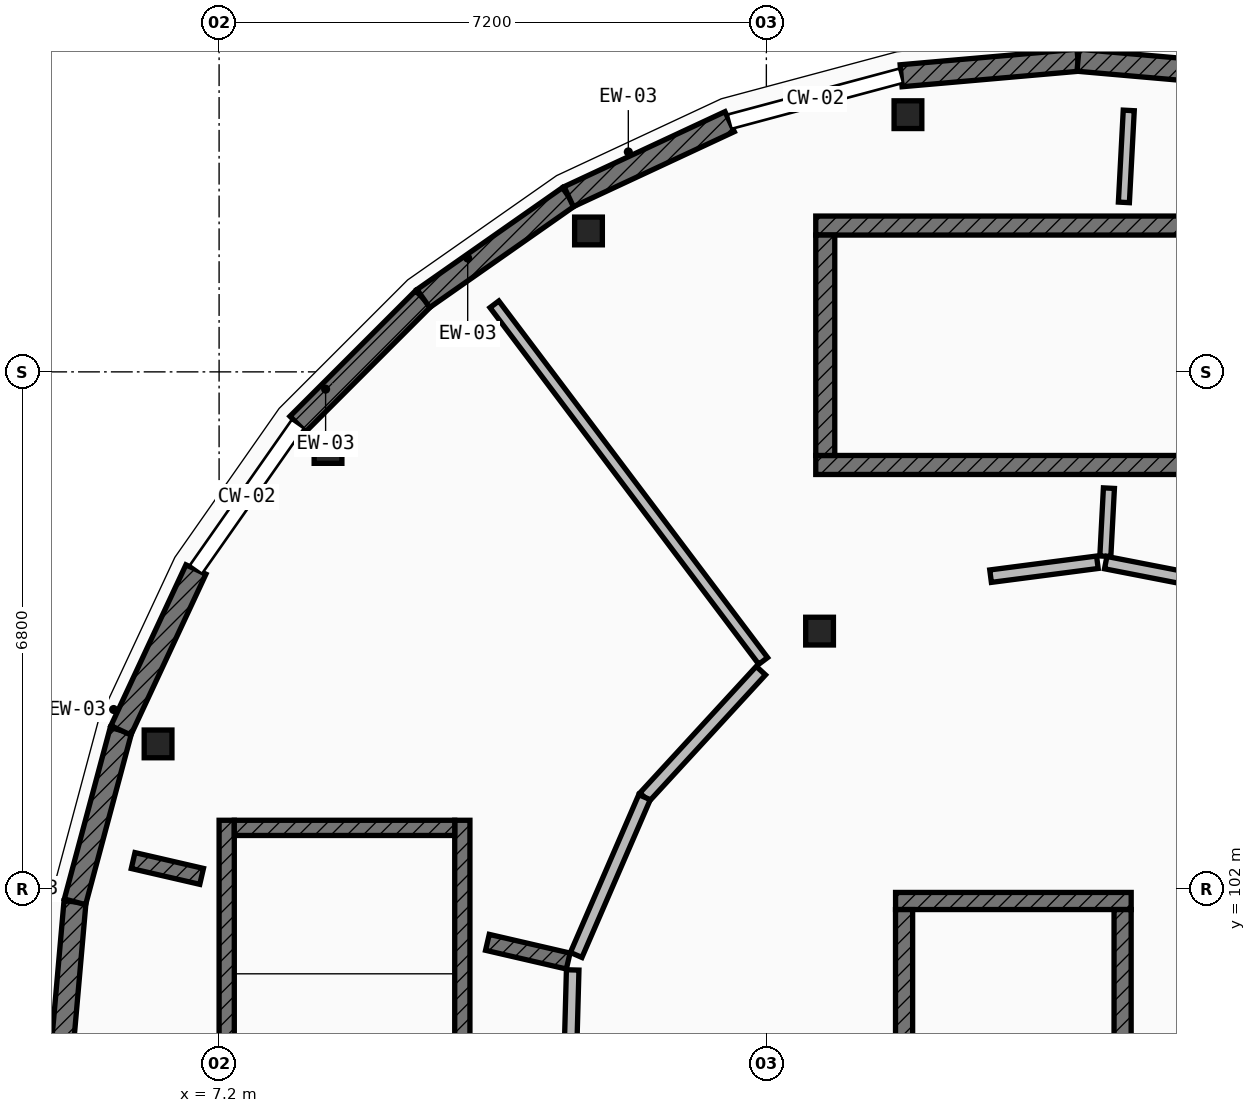
"""IFC4 building model, lengths in metres.
Left out: names, types, materials, properties, quantities, classifications, styles, units other than length and angle.
Written with IfcOpenShell. Run it as: python <this file> out.ifc"""

import sys

from ifc_helpers import new_model, si_unit, direction, frame, frame_2d, origin, origin_2d, place, context, subcontext, project, spatial, rectangle, extrude, element, fill, save


model = new_model("IFC4")
c1 = context("Model", 3, precision=1e-05, world=origin(), true_north=direction((0.0, 1.0)))
c2 = subcontext(c1, "Body", "Model", "MODEL_VIEW")
j1 = project(units=[si_unit("LENGTHUNIT", "METRE"), si_unit("PLANEANGLEUNIT", "RADIAN")], contexts=[c1])
p1 = place(None, origin())
s1 = spatial("IfcSite", under=j1, at=p1, CompositionType="ELEMENT")
p2 = place(p1, origin())
s2 = spatial("IfcBuilding", under=s1, at=p2, CompositionType="ELEMENT")
p3 = place(p2, frame((0.0, 0.0, 8.75)))
s3 = spatial("IfcBuildingStorey", under=s2, at=p3, CompositionType="ELEMENT", Elevation=8.75)
for number, where, z_axis, x_axis in (
    (1, (16.263, 112.184, 0.0), (0.0, 0.0, 1.0), (1.0, 0.0, 0.0)),
    (2, (12.06, 110.654, 0.0), (0.0, 0.0, 1.0), (1.0, 0.0, 0.0)),
    (3, (8.633, 107.779, 0.0), (0.0, 0.0, 1.0), (1.0, 0.0, 0.0)),
    (4, (6.397, 103.905, 0.0), (0.0, 0.0, 1.0), (1.0, 0.0, 0.0)),
    (5, (15.1, 105.389, 0.0), (0.0, 0.0, 1.0), (1.0, 0.0, 0.0)),
):
    element("IfcColumn", number, at=place(p3, frame(where, z_axis=z_axis, x_axis=x_axis)), inside=s3, PredefinedType="COLUMN", context=c2, shape_type="SweptSolid", body=[
        extrude(rectangle(XDim=0.365, YDim=0.365, at=origin_2d()), origin(), (0.0, 0.0, 1.0), 4.2),
    ])
p4 = place(p3, frame((5.1, 99.5, 0.0), z_axis=(0.0, 0.0, 1.0), x_axis=(0.087274565792, 0.996184295282, 0.0)))
e6 = element("IfcWall", 6, at=p4, inside=s3, PredefinedType="ELEMENTEDWALL", context=c2, shape_type="SweptSolid", body=[
    extrude(rectangle(XDim=2.336, YDim=0.29, at=frame_2d((1.168, 0.0))), origin(), (0.0, 0.0, 1.0), 3.329),
])
p5 = place(p3, frame((5.304, 101.827, 0.0), z_axis=(0.0, 0.0, 1.0), x_axis=(0.258612423585, 0.965981166673, 0.0)))
e7 = element("IfcWall", 7, at=p5, inside=s3, PredefinedType="ELEMENTEDWALL", context=c2, shape_type="SweptSolid", body=[
    extrude(rectangle(XDim=2.335, YDim=0.29, at=frame_2d((1.168, 0.0))), origin(), (0.0, 0.0, 1.0), 3.329),
])
p6 = place(p5, frame((0.718, 0.0, 0.85)))
e8 = element("IfcOpeningElement", 8, at=p6, cuts=e7, PredefinedType="OPENING", context=c2, shape_type="SweptSolid", body=[
    extrude(rectangle(XDim=0.9, YDim=1.4, at=frame_2d((0.45, 0.7))), frame((0.0, 0.155, 0.0), z_axis=(0.0, -1.0, 0.0), x_axis=(1.0, 0.0, 0.0)), (0.0, 0.0, 1.0), 0.31),
])
p7 = place(p3, frame((5.908, 104.083, 0.0), z_axis=(0.0, 0.0, 1.0), x_axis=(0.422587894318, 0.906321946979, 0.0)))
e9 = element("IfcWall", 9, at=p7, inside=s3, PredefinedType="ELEMENTEDWALL", context=c2, shape_type="SweptSolid", body=[
    extrude(rectangle(XDim=2.336, YDim=0.29, at=frame_2d((1.168, 0.0))), origin(), (0.0, 0.0, 1.0), 3.329),
])
p8 = place(p7, frame((0.718, 0.0, 0.85)))
e10 = element("IfcOpeningElement", 10, at=p8, cuts=e9, PredefinedType="OPENING", context=c2, shape_type="SweptSolid", body=[
    extrude(rectangle(XDim=0.9, YDim=1.65, at=frame_2d((0.45, 0.825))), frame((0.0, 0.155, 0.0), z_axis=(0.0, -1.0, 0.0), x_axis=(1.0, 0.0, 0.0)), (0.0, 0.0, 1.0), 0.31),
])
p9 = place(p3, frame((8.235, 108.113, 0.0), z_axis=(0.0, 0.0, 1.0), x_axis=(0.707106781187, 0.707106781187, 0.0)))
e11 = element("IfcWall", 11, at=p9, inside=s3, PredefinedType="ELEMENTEDWALL", context=c2, shape_type="SweptSolid", body=[
    extrude(rectangle(XDim=2.336, YDim=0.29, at=frame_2d((1.168, 0.0))), origin(), (0.0, 0.0, 1.0), 3.329),
])
p10 = place(p9, frame((0.718, 0.0, 0.85)))
e12 = element("IfcOpeningElement", 12, at=p10, cuts=e11, PredefinedType="OPENING", context=c2, shape_type="SweptSolid", body=[
    extrude(rectangle(XDim=0.9, YDim=1.9, at=frame_2d((0.45, 0.95))), frame((0.0, 0.155, 0.0), z_axis=(0.0, -1.0, 0.0), x_axis=(1.0, 0.0, 0.0)), (0.0, 0.0, 1.0), 0.31),
])
p11 = place(p3, frame((9.887, 109.765, 0.0), z_axis=(0.0, 0.0, 1.0), x_axis=(0.819045278347, 0.573728883722, 0.0)))
e13 = element("IfcWall", 13, at=p11, inside=s3, PredefinedType="ELEMENTEDWALL", context=c2, shape_type="SweptSolid", body=[
    extrude(rectangle(XDim=2.336, YDim=0.29, at=frame_2d((1.168, 0.0))), origin(), (0.0, 0.0, 1.0), 3.329),
])
p12 = place(p11, frame((0.708, 0.0, 0.85)))
e14 = element("IfcOpeningElement", 14, at=p12, cuts=e13, PredefinedType="OPENING", context=c2, shape_type="SweptSolid", body=[
    extrude(rectangle(XDim=0.92, YDim=1.55, at=frame_2d((0.46, 0.775))), frame((0.0, 0.155, 0.0), z_axis=(0.0, -1.0, 0.0), x_axis=(1.0, 0.0, 0.0)), (0.0, 0.0, 1.0), 0.31),
])
p13 = place(p3, frame((11.8, 111.105, 0.0), z_axis=(0.0, 0.0, 1.0), x_axis=(0.906321946979, 0.422587894318, 0.0)))
e15 = element("IfcWall", 15, at=p13, inside=s3, PredefinedType="ELEMENTEDWALL", context=c2, shape_type="SweptSolid", body=[
    extrude(rectangle(XDim=2.336, YDim=0.29, at=frame_2d((1.168, 0.0))), origin(), (0.0, 0.0, 1.0), 3.329),
])
p14 = place(p13, frame((0.693, 0.0, 0.85)))
e16 = element("IfcOpeningElement", 16, at=p14, cuts=e15, PredefinedType="OPENING", context=c2, shape_type="SweptSolid", body=[
    extrude(rectangle(XDim=0.95, YDim=1.35, at=frame_2d((0.475, 0.675))), frame((0.0, 0.155, 0.0), z_axis=(0.0, -1.0, 0.0), x_axis=(1.0, 0.0, 0.0)), (0.0, 0.0, 1.0), 0.31),
])
for number, where, z_axis, x_axis in (
    (17, (16.173, 112.696, 0.0), (0.0, 0.0, 1.0), (0.996, 0.087, 0.0)),
    (18, (18.5, 112.9, 0.0), (0.0, 0.0, 1.0), (0.996, -0.087, 0.0)),
):
    element("IfcWall", number, at=place(p3, frame(where, z_axis=z_axis, x_axis=x_axis)), inside=s3, PredefinedType="ELEMENTEDWALL", context=c2, shape_type="SweptSolid", body=[
        extrude(rectangle(XDim=2.336, YDim=0.29, at=frame_2d((1.168, 0.0))), origin(), (0.0, 0.0, 1.0), 3.329),
    ])
p15 = place(p3, frame((15.05, 107.575, 0.0), z_axis=(0.0, 0.0, 1.0), x_axis=(1.0, 0.0, 0.0)))
e19 = element("IfcWall", 19, at=p15, inside=s3, PredefinedType="SHEAR", context=c2, shape_type="SweptSolid", body=[
    extrude(rectangle(XDim=6.9, YDim=0.25, at=frame_2d((3.45, 0.0))), origin(), (0.0, 0.0, 1.0), 3.975),
])
p16 = place(p15, frame((0.43, 0.0, 0.0)))
e20 = element("IfcOpeningElement", 20, at=p16, cuts=e19, PredefinedType="OPENING", context=c2, shape_type="SweptSolid", body=[
    extrude(rectangle(XDim=1.1, YDim=2.15, at=frame_2d((0.55, 1.075))), frame((0.0, 0.135, 0.0), z_axis=(0.0, -1.0, 0.0), x_axis=(1.0, 0.0, 0.0)), (0.0, 0.0, 1.0), 0.27),
])
p17 = place(p3, frame((15.05, 110.725, 0.0), z_axis=(0.0, 0.0, 1.0), x_axis=(1.0, 0.0, 0.0)))
e21 = element("IfcWall", 21, at=p17, inside=s3, PredefinedType="SHEAR", context=c2, shape_type="SweptSolid", body=[
    extrude(rectangle(XDim=6.9, YDim=0.25, at=frame_2d((3.45, 0.0))), origin(), (0.0, 0.0, 1.0), 3.975),
])
p18 = place(p3, frame((15.175, 107.7, 0.0), z_axis=(0.0, 0.0, 1.0), x_axis=(0.0, 1.0, 0.0)))
e22 = element("IfcWall", 22, at=p18, inside=s3, PredefinedType="SHEAR", context=c2, shape_type="SweptSolid", body=[
    extrude(rectangle(XDim=2.9, YDim=0.25, at=frame_2d((1.45, 0.0))), origin(), (0.0, 0.0, 1.0), 3.975),
])
p19 = place(p3, frame((10.4, 96.1, 0.0), z_axis=(0.0, 0.0, 1.0), x_axis=(0.0, 1.0, 0.0)))
e23 = element("IfcWall", 23, at=p19, inside=s3, PredefinedType="SHEAR", context=c2, shape_type="SweptSolid", body=[
    extrude(rectangle(XDim=6.8, YDim=0.2, at=frame_2d((3.4, 0.0))), origin(), (0.0, 0.0, 1.0), 3.975),
])
p20 = place(p19, frame((0.38, 0.0, 0.0)))
e24 = element("IfcOpeningElement", 24, at=p20, cuts=e23, PredefinedType="OPENING", context=c2, shape_type="SweptSolid", body=[
    extrude(rectangle(XDim=1.05, YDim=2.15, at=frame_2d((0.525, 1.075))), frame((0.0, 0.11, 0.0), z_axis=(0.0, -1.0, 0.0), x_axis=(1.0, 0.0, 0.0)), (0.0, 0.0, 1.0), 0.22),
])
p21 = place(p3, frame((7.3, 96.1, 0.0), z_axis=(0.0, 0.0, 1.0), x_axis=(0.0, 1.0, 0.0)))
e25 = element("IfcWall", 25, at=p21, inside=s3, PredefinedType="SHEAR", context=c2, shape_type="SweptSolid", body=[
    extrude(rectangle(XDim=6.8, YDim=0.2, at=frame_2d((3.4, 0.0))), origin(), (0.0, 0.0, 1.0), 3.975),
])
p22 = place(p3, frame((10.3, 102.8, 0.0), z_axis=(0.0, 0.0, 1.0), x_axis=(-1.0, 0.0, 0.0)))
e26 = element("IfcWall", 26, at=p22, inside=s3, PredefinedType="SHEAR", context=c2, shape_type="SweptSolid", body=[
    extrude(rectangle(XDim=2.9, YDim=0.2, at=frame_2d((1.45, 0.0))), origin(), (0.0, 0.0, 1.0), 3.975),
])
p23 = place(p3, frame((16.1, 101.838, 0.0), z_axis=(0.0, 0.0, 1.0), x_axis=(1.0, 0.0, 0.0)))
e27 = element("IfcWall", 27, at=p23, inside=s3, PredefinedType="SHEAR", context=c2, shape_type="SweptSolid", body=[
    extrude(rectangle(XDim=3.1, YDim=0.225, at=frame_2d((1.55, 0.0))), origin(), (0.0, 0.0, 1.0), 3.975),
])
for number, where, z_axis, x_axis in (
    (28, (16.212, 99.575, 0.0), (0.0, 0.0, 1.0), (0.0, 1.0, 0.0)),
    (29, (19.087, 99.575, 0.0), (0.0, 0.0, 1.0), (0.0, 1.0, 0.0)),
):
    element("IfcWall", number, at=place(p3, frame(where, z_axis=z_axis, x_axis=x_axis)), inside=s3, PredefinedType="SHEAR", context=c2, shape_type="SweptSolid", body=[
        extrude(rectangle(XDim=2.15, YDim=0.225, at=frame_2d((1.075, 0.0))), origin(), (0.0, 0.0, 1.0), 3.975),
    ])
p24 = place(p3, frame((18.86, 106.374, 0.0), z_axis=(0.0, 0.0, 1.0), x_axis=(0.052244629109, 0.998634316819, 0.0)))
e30 = element("IfcWall", 30, at=p24, inside=s3, PredefinedType="PARTITIONING", context=c2, shape_type="SweptSolid", body=[
    extrude(rectangle(XDim=0.897, YDim=0.145, at=frame_2d((0.449, 0.0))), origin(), (0.0, 0.0, 1.0), 3.304),
])
p25 = place(p3, frame((19.104, 111.03, 0.0), z_axis=(0.0, 0.0, 1.0), x_axis=(0.05279149634, 0.998605556721, 0.0)))
e31 = element("IfcWall", 31, at=p25, inside=s3, PredefinedType="PARTITIONING", context=c2, shape_type="SweptSolid", body=[
    extrude(rectangle(XDim=1.212, YDim=0.145, at=frame_2d((0.606, 0.0))), origin(), (0.0, 0.0, 1.0), 3.304),
])
p26 = place(p3, frame((14.358, 104.997, 0.0), z_axis=(0.0, 0.0, 1.0), x_axis=(-0.601846782462, 0.798611576701, 0.0)))
e32 = element("IfcWall", 32, at=p26, inside=s3, PredefinedType="PARTITIONING", context=c2, shape_type="SweptSolid", body=[
    extrude(rectangle(XDim=5.875, YDim=0.145, at=frame_2d((2.938, 0.0))), origin(), (0.0, 0.0, 1.0), 3.304),
])
p27 = place(p3, frame((11.793, 101.048, 0.0), z_axis=(0.0, 0.0, 1.0), x_axis=(-0.974281711151, 0.225333413672, 0.0)))
e33 = element("IfcWall", 33, at=p27, inside=s3, PredefinedType="SOLIDWALL", context=c2, shape_type="SweptSolid", body=[
    extrude(rectangle(XDim=1.091, YDim=0.215, at=frame_2d((0.545, 0.0))), origin(), (0.0, 0.0, 1.0), 3.304),
])
p28 = place(p3, frame((6.97, 102.162, 0.0), z_axis=(0.0, 0.0, 1.0), x_axis=(-0.974364486591, 0.22497521479, 0.0)))
e34 = element("IfcWall", 34, at=p28, inside=s3, PredefinedType="SOLIDWALL", context=c2, shape_type="SweptSolid", body=[
    extrude(rectangle(XDim=0.925, YDim=0.215, at=frame_2d((0.462, 0.0))), origin(), (0.0, 0.0, 1.0), 3.304),
])
p29 = place(p3, frame((18.755, 106.295, 0.0), z_axis=(0.0, 0.0, 1.0), x_axis=(-0.991634012436, -0.129081313054, 0.0)))
e35 = element("IfcWall", 35, at=p29, inside=s3, PredefinedType="PARTITIONING", context=c2, shape_type="SweptSolid", body=[
    extrude(rectangle(XDim=1.417, YDim=0.165, at=frame_2d((0.708, 0.0))), origin(), (0.0, 0.0, 1.0), 3.304),
])
p30 = place(p29, frame((0.258, 0.0, 0.0)))
e36 = element("IfcOpeningElement", 36, at=p30, cuts=e35, PredefinedType="OPENING", context=c2, shape_type="SweptSolid", body=[
    extrude(rectangle(XDim=0.9, YDim=2.1, at=frame_2d((0.45, 1.05))), frame((0.0, 0.093, 0.0), z_axis=(0.0, -1.0, 0.0), x_axis=(1.0, 0.0, 0.0)), (0.0, 0.0, 1.0), 0.185),
])
p31 = place(p3, frame((14.328, 104.869, 0.0), z_axis=(0.0, 0.0, 1.0), x_axis=(-0.676853044356, -0.736118167379, 0.0)))
e37 = element("IfcWall", 37, at=p31, inside=s3, PredefinedType="PARTITIONING", context=c2, shape_type="SweptSolid", body=[
    extrude(rectangle(XDim=2.261, YDim=0.165, at=frame_2d((1.131, 0.0))), origin(), (0.0, 0.0, 1.0), 3.304),
])
p32 = place(p31, frame((0.566, 0.0, 0.0)))
e38 = element("IfcOpeningElement", 38, at=p32, cuts=e37, PredefinedType="OPENING", context=c2, shape_type="SweptSolid", body=[
    extrude(rectangle(XDim=1.13, YDim=2.14, at=frame_2d((0.565, 1.07))), frame((0.0, 0.093, 0.0), z_axis=(0.0, -1.0, 0.0), x_axis=(1.0, 0.0, 0.0)), (0.0, 0.0, 1.0), 0.185),
])
p33 = place(p3, frame((12.797, 103.204, 0.0), z_axis=(0.0, 0.0, 1.0), x_axis=(-0.397419678039, -0.917636964985, 0.0)))
e39 = element("IfcWall", 39, at=p33, inside=s3, PredefinedType="PARTITIONING", context=c2, shape_type="SweptSolid", body=[
    extrude(rectangle(XDim=2.262, YDim=0.165, at=frame_2d((1.131, 0.0))), origin(), (0.0, 0.0, 1.0), 3.304),
])
p34 = place(p3, frame((11.852, 100.931, 0.0), z_axis=(0.0, 0.0, 1.0), x_axis=(-0.027291914499, -0.999627506326, 0.0)))
e40 = element("IfcWall", 40, at=p34, inside=s3, PredefinedType="PARTITIONING", context=c2, shape_type="SweptSolid", body=[
    extrude(rectangle(XDim=2.496, YDim=0.165, at=frame_2d((1.248, 0.0))), origin(), (0.0, 0.0, 1.0), 3.304),
])
p35 = place(p34, frame((0.523, 0.0, 0.0)))
e41 = element("IfcOpeningElement", 41, at=p35, cuts=e40, PredefinedType="OPENING", context=c2, shape_type="SweptSolid", body=[
    extrude(rectangle(XDim=1.45, YDim=2.28, at=frame_2d((0.725, 1.14))), frame((0.0, 0.093, 0.0), z_axis=(0.0, -1.0, 0.0), x_axis=(1.0, 0.0, 0.0)), (0.0, 0.0, 1.0), 0.185),
])
p36 = place(p3, frame((20.714, 105.93, 0.0), z_axis=(0.0, 0.0, 1.0), x_axis=(-0.981560041322, 0.191154087794, 0.0)))
e42 = element("IfcWall", 42, at=p36, inside=s3, PredefinedType="PARTITIONING", context=c2, shape_type="SweptSolid", body=[
    extrude(rectangle(XDim=1.884, YDim=0.165, at=frame_2d((0.942, 0.0))), origin(), (0.0, 0.0, 1.0), 3.304),
])
p37 = place(p6, origin())
e43 = element("IfcWindow", 43, at=p37, inside=s3, PartitioningType="SINGLE_PANEL", PredefinedType="WINDOW", context=c2, shape_type="SweptSolid", body=[
    extrude(rectangle(XDim=0.9, YDim=1.4, at=frame_2d((0.45, 0.7))), frame((0.0, 0.03, 0.0), z_axis=(0.0, -1.0, 0.0), x_axis=(1.0, 0.0, 0.0)), (0.0, 0.0, 1.0), 0.06),
])
fill(e8, e43)
p38 = place(p8, origin())
e44 = element("IfcWindow", 44, at=p38, inside=s3, PartitioningType="SINGLE_PANEL", PredefinedType="WINDOW", context=c2, shape_type="SweptSolid", body=[
    extrude(rectangle(XDim=0.9, YDim=1.65, at=frame_2d((0.45, 0.825))), frame((0.0, 0.03, 0.0), z_axis=(0.0, -1.0, 0.0), x_axis=(1.0, 0.0, 0.0)), (0.0, 0.0, 1.0), 0.06),
])
fill(e10, e44)
p39 = place(p10, origin())
e45 = element("IfcWindow", 45, at=p39, inside=s3, PartitioningType="SINGLE_PANEL", PredefinedType="WINDOW", context=c2, shape_type="SweptSolid", body=[
    extrude(rectangle(XDim=0.9, YDim=1.9, at=frame_2d((0.45, 0.95))), frame((0.0, 0.03, 0.0), z_axis=(0.0, -1.0, 0.0), x_axis=(1.0, 0.0, 0.0)), (0.0, 0.0, 1.0), 0.06),
])
fill(e12, e45)
p40 = place(p12, origin())
e46 = element("IfcWindow", 46, at=p40, inside=s3, PartitioningType="SINGLE_PANEL", PredefinedType="WINDOW", context=c2, shape_type="SweptSolid", body=[
    extrude(rectangle(XDim=0.92, YDim=1.55, at=frame_2d((0.46, 0.775))), frame((0.0, 0.03, 0.0), z_axis=(0.0, -1.0, 0.0), x_axis=(1.0, 0.0, 0.0)), (0.0, 0.0, 1.0), 0.06),
])
fill(e14, e46)
p41 = place(p14, origin())
e47 = element("IfcWindow", 47, at=p41, inside=s3, PartitioningType="SINGLE_PANEL", PredefinedType="WINDOW", context=c2, shape_type="SweptSolid", body=[
    extrude(rectangle(XDim=0.95, YDim=1.35, at=frame_2d((0.475, 0.675))), frame((0.0, 0.03, 0.0), z_axis=(0.0, -1.0, 0.0), x_axis=(1.0, 0.0, 0.0)), (0.0, 0.0, 1.0), 0.06),
])
fill(e16, e47)
p42 = place(p16, origin())
e48 = element("IfcDoor", 48, at=p42, inside=s3, OperationType="SINGLE_SWING_RIGHT", PredefinedType="DOOR", context=c2, shape_type="SweptSolid", body=[
    extrude(rectangle(XDim=1.1, YDim=2.15, at=frame_2d((0.55, 1.075))), frame((0.0, 0.025, 0.0), z_axis=(0.0, -1.0, 0.0), x_axis=(1.0, 0.0, 0.0)), (0.0, 0.0, 1.0), 0.05),
])
fill(e20, e48)
p43 = place(p30, origin())
e49 = element("IfcDoor", 49, at=p43, inside=s3, OperationType="SINGLE_SWING_RIGHT", PredefinedType="DOOR", context=c2, shape_type="SweptSolid", body=[
    extrude(rectangle(XDim=0.9, YDim=2.1, at=frame_2d((0.45, 1.05))), frame((0.0, 0.025, 0.0), z_axis=(0.0, -1.0, 0.0), x_axis=(1.0, 0.0, 0.0)), (0.0, 0.0, 1.0), 0.05),
])
fill(e36, e49)
p44 = place(p32, origin())
e50 = element("IfcDoor", 50, at=p44, inside=s3, OperationType="SINGLE_SWING_LEFT", PredefinedType="DOOR", context=c2, shape_type="SweptSolid", body=[
    extrude(rectangle(XDim=1.13, YDim=2.14, at=frame_2d((0.565, 1.07))), frame((0.0, 0.025, 0.0), z_axis=(0.0, -1.0, 0.0), x_axis=(1.0, 0.0, 0.0)), (0.0, 0.0, 1.0), 0.05),
])
fill(e38, e50)
p45 = place(p35, origin())
e51 = element("IfcDoor", 51, at=p45, inside=s3, OperationType="SINGLE_SWING_RIGHT", PredefinedType="DOOR", context=c2, shape_type="SweptSolid", body=[
    extrude(rectangle(XDim=1.45, YDim=2.28, at=frame_2d((0.725, 1.14))), frame((0.0, 0.025, 0.0), z_axis=(0.0, -1.0, 0.0), x_axis=(1.0, 0.0, 0.0)), (0.0, 0.0, 1.0), 0.05),
])
fill(e41, e51)
save(model, sys.argv[1])
